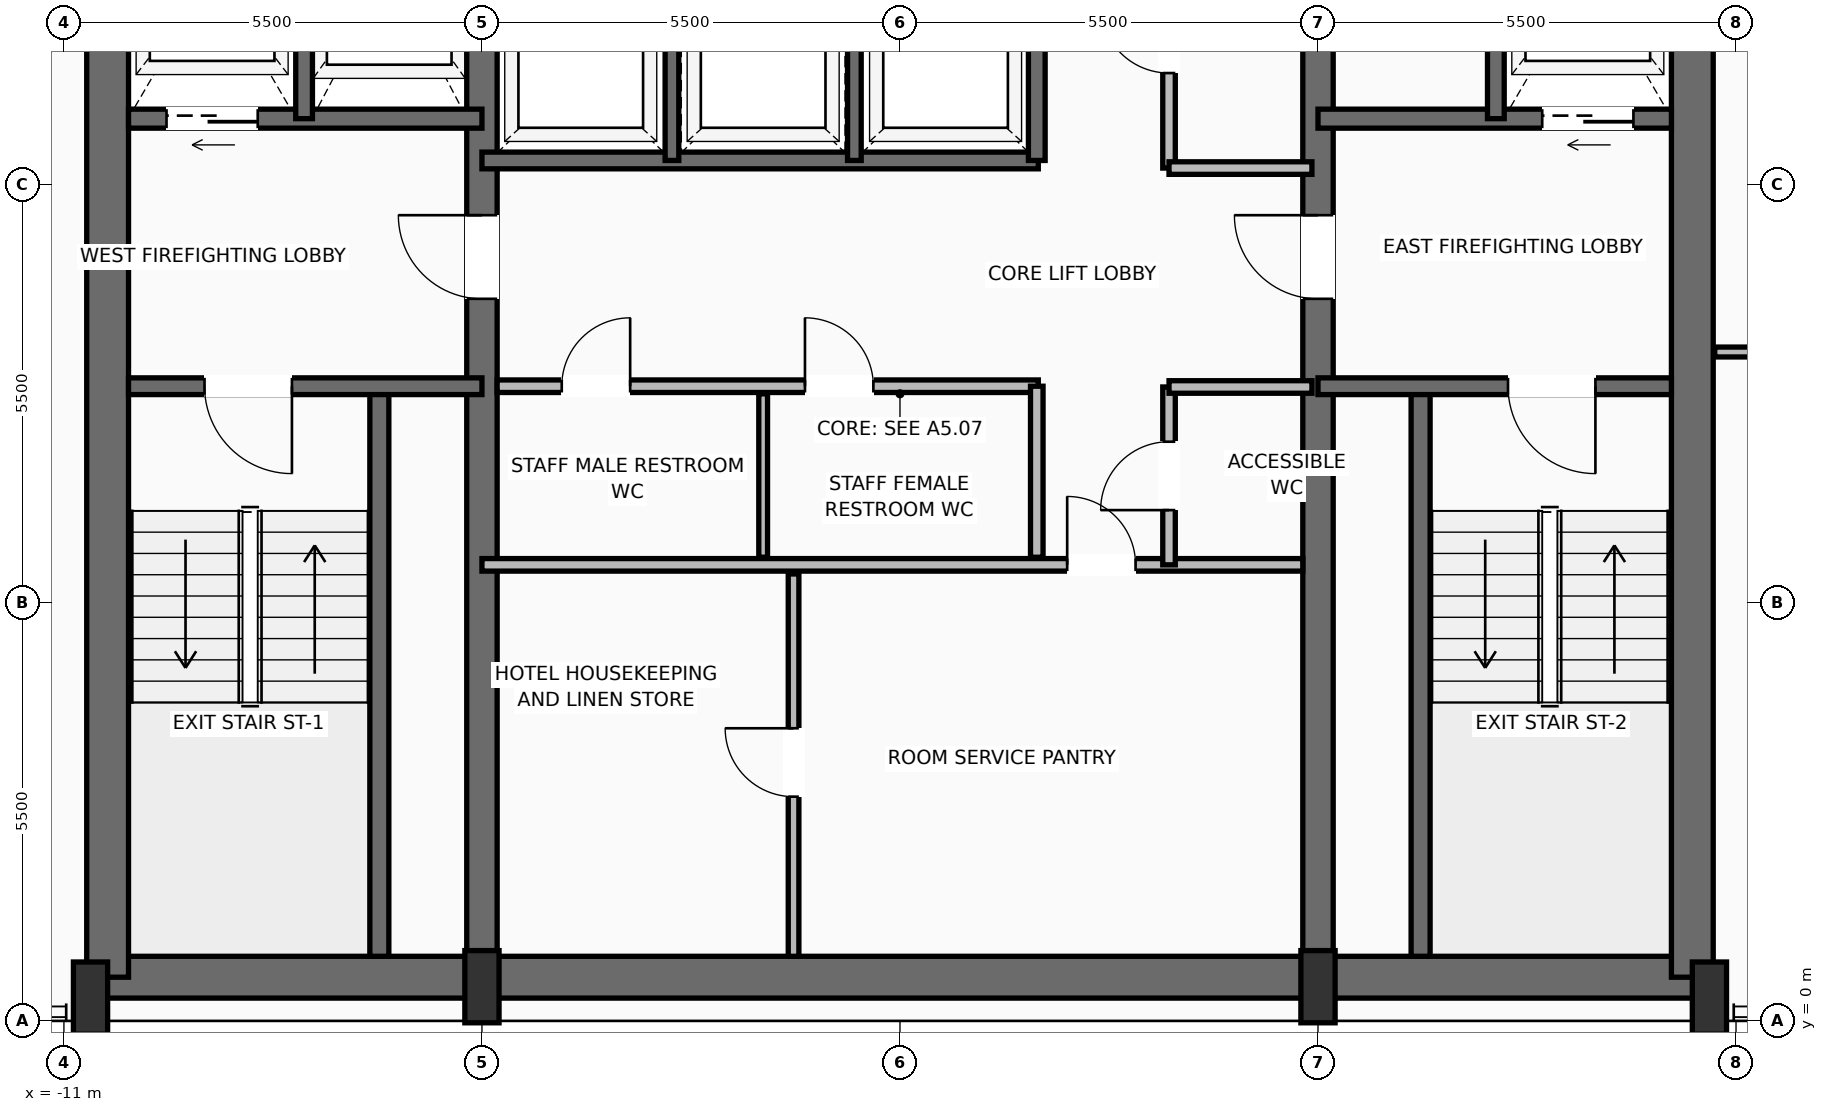
"""IFC4 building model, lengths in metres.
Left out: names, types, materials, properties, quantities, classifications, styles, units other than length and angle.
Written with IfcOpenShell. Run it as: python <this file> out.ifc"""

import sys

from ifc_helpers import new_model, si_unit, direction, frame, frame_2d, origin, origin_2d, place, context, subcontext, project, spatial, rectangle, extrude, source, transform, mapped, element, fill, save


model = new_model("IFC4")
c1 = context("Model", 3, precision=1e-05, world=origin(), true_north=direction((0.0, 1.0)))
c2 = subcontext(c1, "Body", "Model", "MODEL_VIEW")
j1 = project(units=[si_unit("LENGTHUNIT", "METRE"), si_unit("PLANEANGLEUNIT", "RADIAN")], contexts=[c1])
p1 = place(None, origin())
s1 = spatial("IfcSite", under=j1, at=p1, CompositionType="ELEMENT")
p2 = place(p1, origin())
s2 = spatial("IfcBuilding", under=s1, at=p2, CompositionType="ELEMENT")
p3 = place(p2, frame((0.0, 0.0, 240.7)))
s3 = spatial("IfcBuildingStorey", under=s2, at=p3, CompositionType="ELEMENT", Elevation=240.7)
p4 = place(p3, frame((-10.65, 0.575, 0.0), z_axis=(0.0, 0.0, 1.0), x_axis=(1.0, 0.0, 0.0)))
e1 = element("IfcWall", 1, at=p4, inside=s3, PredefinedType="SHEAR", context=c2, shape_type="SweptSolid", body=[
    extrude(rectangle(XDim=21.3, YDim=0.55, at=frame_2d((10.65, 0.0))), origin(), (0.0, 0.0, 1.0), 3.24),
])
for number, where, z_axis, x_axis in (
    (2, (-10.425, 0.575, 0.0), (0.0, 0.0, 1.0), (0.0, 1.0, 0.0)),
    (3, (10.425, 0.575, 0.0), (0.0, 0.0, 1.0), (0.0, 1.0, 0.0)),
):
    element("IfcWall", number, at=place(p3, frame(where, z_axis=z_axis, x_axis=x_axis)), inside=s3, PredefinedType="SHEAR", context=c2, shape_type="SweptSolid", body=[
        extrude(rectangle(XDim=15.45, YDim=0.55, at=frame_2d((7.725, 0.0))), origin(), (0.0, 0.0, 1.0), 3.24),
    ])
p5 = place(p3, frame((-5.5, 0.575, 0.0), z_axis=(0.0, 0.0, 1.0), x_axis=(0.0, 1.0, 0.0)))
e4 = element("IfcWall", 4, at=p5, inside=s3, PredefinedType="SHEAR", context=c2, shape_type="SweptSolid", body=[
    extrude(rectangle(XDim=15.45, YDim=0.4, at=frame_2d((7.725, 0.0))), origin(), (0.0, 0.0, 1.0), 3.24),
])
p6 = place(p5, frame((8.925, 0.0, 0.0)))
e5 = element("IfcOpeningElement", 5, at=p6, cuts=e4, PredefinedType="OPENING", context=c2, shape_type="SweptSolid", body=[
    extrude(rectangle(XDim=1.1, YDim=2.2, at=frame_2d((0.55, 1.1))), frame((0.0, 0.21, 0.0), z_axis=(0.0, -1.0, 0.0), x_axis=(1.0, 0.0, 0.0)), (0.0, 0.0, 1.0), 0.42),
])
p7 = place(p3, frame((5.5, 0.575, 0.0), z_axis=(0.0, 0.0, 1.0), x_axis=(0.0, 1.0, 0.0)))
e6 = element("IfcWall", 6, at=p7, inside=s3, PredefinedType="SHEAR", context=c2, shape_type="SweptSolid", body=[
    extrude(rectangle(XDim=15.45, YDim=0.4, at=frame_2d((7.725, 0.0))), origin(), (0.0, 0.0, 1.0), 3.24),
])
p8 = place(p7, frame((8.925, 0.0, 0.0)))
e7 = element("IfcOpeningElement", 7, at=p8, cuts=e6, PredefinedType="OPENING", context=c2, shape_type="SweptSolid", body=[
    extrude(rectangle(XDim=1.1, YDim=2.2, at=frame_2d((0.55, 1.1))), frame((0.0, 0.21, 0.0), z_axis=(0.0, -1.0, 0.0), x_axis=(1.0, 0.0, 0.0)), (0.0, 0.0, 1.0), 0.42),
])
m1 = source(origin(), c2, "Body", "SweptSolid", [
    extrude(rectangle(XDim=0.45, YDim=0.95, at=origin_2d()), origin(), (0.0, 0.0, 1.0), 3.45),
])
for number, where, z_axis, x_axis in (
    (8, (-10.65, 0.3, 0.0), (0.0, 0.0, 1.0), (1.0, 0.0, 0.0)),
    (9, (-5.5, 0.45, 0.0), (0.0, 0.0, 1.0), (1.0, 0.0, 0.0)),
    (10, (5.5, 0.45, 0.0), (0.0, 0.0, 1.0), (1.0, 0.0, 0.0)),
    (11, (10.65, 0.3, 0.0), (0.0, 0.0, 1.0), (1.0, 0.0, 0.0)),
):
    element("IfcColumn", number, at=place(p3, frame(where, z_axis=z_axis, x_axis=x_axis)), inside=s3, PredefinedType="PILASTER", context=c2, shape_type="MappedRepresentation", body=[
        mapped(m1, transform((0.0, 0.0, 0.0), scale=1.0)),
    ])
p9 = place(p3, frame((-6.85, 0.85, 0.0), z_axis=(0.0, 0.0, 1.0), x_axis=(0.0, 1.0, 0.0)))
e12 = element("IfcWall", 12, at=p9, inside=s3, PredefinedType="SOLIDWALL", context=c2, shape_type="SweptSolid", body=[
    extrude(rectangle(XDim=7.5, YDim=0.25, at=frame_2d((3.75, 0.0))), origin(), (0.0, 0.0, 1.0), 3.24),
])
p10 = place(p3, frame((-5.5, 8.35, 0.0), z_axis=(0.0, 0.0, 1.0), x_axis=(-1.0, 0.0, 0.0)))
e13 = element("IfcWall", 13, at=p10, inside=s3, PredefinedType="SOLIDWALL", context=c2, shape_type="SweptSolid", body=[
    extrude(rectangle(XDim=4.65, YDim=0.22, at=frame_2d((2.325, 0.0))), origin(), (0.0, 0.0, 1.0), 3.24),
])
p11 = place(p10, frame((2.5, 0.0, 0.0)))
e14 = element("IfcOpeningElement", 14, at=p11, cuts=e13, PredefinedType="OPENING", context=c2, shape_type="SweptSolid", body=[
    extrude(rectangle(XDim=1.15, YDim=2.2, at=frame_2d((0.575, 1.1))), frame((0.0, 0.12, 0.0), z_axis=(0.0, -1.0, 0.0), x_axis=(1.0, 0.0, 0.0)), (0.0, 0.0, 1.0), 0.24),
])
p12 = place(p3, frame((-5.5, 11.87, 0.0), z_axis=(0.0, 0.0, 1.0), x_axis=(-1.0, 0.0, 0.0)))
e15 = element("IfcWall", 15, at=p12, inside=s3, PredefinedType="SOLIDWALL", context=c2, shape_type="SweptSolid", body=[
    extrude(rectangle(XDim=4.65, YDim=0.25, at=frame_2d((2.325, 0.0))), origin(), (0.0, 0.0, 1.0), 3.24),
])
p13 = place(p12, frame((2.95, 0.0, 0.0)))
e16 = element("IfcOpeningElement", 16, at=p13, cuts=e15, PredefinedType="OPENING", context=c2, shape_type="SweptSolid", body=[
    extrude(rectangle(XDim=1.2, YDim=2.25, at=frame_2d((0.6, 1.125))), frame((0.0, 0.135, 0.0), z_axis=(0.0, -1.0, 0.0), x_axis=(1.0, 0.0, 0.0)), (0.0, 0.0, 1.0), 0.27),
])
p14 = place(p3, frame((-7.84, 11.87, 0.0), z_axis=(0.0, 0.0, 1.0), x_axis=(0.0, 1.0, 0.0)))
e17 = element("IfcWall", 17, at=p14, inside=s3, PredefinedType="SOLIDWALL", context=c2, shape_type="SweptSolid", body=[
    extrude(rectangle(XDim=3.88, YDim=0.22, at=frame_2d((1.94, 0.0))), origin(), (0.0, 0.0, 1.0), 3.24),
])
p15 = place(p3, frame((6.85, 0.85, 0.0), z_axis=(0.0, 0.0, 1.0), x_axis=(0.0, 1.0, 0.0)))
e18 = element("IfcWall", 18, at=p15, inside=s3, PredefinedType="SOLIDWALL", context=c2, shape_type="SweptSolid", body=[
    extrude(rectangle(XDim=7.5, YDim=0.25, at=frame_2d((3.75, 0.0))), origin(), (0.0, 0.0, 1.0), 3.24),
])
p16 = place(p3, frame((10.15, 8.35, 0.0), z_axis=(0.0, 0.0, 1.0), x_axis=(-1.0, 0.0, 0.0)))
e19 = element("IfcWall", 19, at=p16, inside=s3, PredefinedType="SOLIDWALL", context=c2, shape_type="SweptSolid", body=[
    extrude(rectangle(XDim=4.65, YDim=0.22, at=frame_2d((2.325, 0.0))), origin(), (0.0, 0.0, 1.0), 3.24),
])
p17 = place(p16, frame((1.0, 0.0, 0.0)))
e20 = element("IfcOpeningElement", 20, at=p17, cuts=e19, PredefinedType="OPENING", context=c2, shape_type="SweptSolid", body=[
    extrude(rectangle(XDim=1.15, YDim=2.2, at=frame_2d((0.575, 1.1))), frame((0.0, 0.12, 0.0), z_axis=(0.0, -1.0, 0.0), x_axis=(1.0, 0.0, 0.0)), (0.0, 0.0, 1.0), 0.24),
])
p18 = place(p3, frame((10.15, 11.87, 0.0), z_axis=(0.0, 0.0, 1.0), x_axis=(-1.0, 0.0, 0.0)))
e21 = element("IfcWall", 21, at=p18, inside=s3, PredefinedType="SOLIDWALL", context=c2, shape_type="SweptSolid", body=[
    extrude(rectangle(XDim=4.65, YDim=0.25, at=frame_2d((2.325, 0.0))), origin(), (0.0, 0.0, 1.0), 3.24),
])
p19 = place(p18, frame((0.5, 0.0, 0.0)))
e22 = element("IfcOpeningElement", 22, at=p19, cuts=e21, PredefinedType="OPENING", context=c2, shape_type="SweptSolid", body=[
    extrude(rectangle(XDim=1.2, YDim=2.25, at=frame_2d((0.6, 1.125))), frame((0.0, 0.135, 0.0), z_axis=(0.0, -1.0, 0.0), x_axis=(1.0, 0.0, 0.0)), (0.0, 0.0, 1.0), 0.27),
])
p20 = place(p3, frame((7.84, 11.87, 0.0), z_axis=(0.0, 0.0, 1.0), x_axis=(0.0, 1.0, 0.0)))
e23 = element("IfcWall", 23, at=p20, inside=s3, PredefinedType="SOLIDWALL", context=c2, shape_type="SweptSolid", body=[
    extrude(rectangle(XDim=3.88, YDim=0.22, at=frame_2d((1.94, 0.0))), origin(), (0.0, 0.0, 1.0), 3.24),
])
p21 = place(p3, frame((-5.5, 6.0, 0.0), z_axis=(0.0, 0.0, 1.0), x_axis=(1.0, 0.0, 0.0)))
e24 = element("IfcWall", 24, at=p21, inside=s3, PredefinedType="PARTITIONING", context=c2, shape_type="SweptSolid", body=[
    extrude(rectangle(XDim=10.8, YDim=0.165, at=frame_2d((5.4, 0.0))), origin(), (0.0, 0.0, 1.0), 3.232),
])
p22 = place(p21, frame((7.7, 0.0, 0.0)))
e25 = element("IfcOpeningElement", 25, at=p22, cuts=e24, PredefinedType="OPENING", context=c2, shape_type="SweptSolid", body=[
    extrude(rectangle(XDim=0.9, YDim=2.1, at=frame_2d((0.45, 1.05))), frame((0.0, 0.093, 0.0), z_axis=(0.0, -1.0, 0.0), x_axis=(1.0, 0.0, 0.0)), (0.0, 0.0, 1.0), 0.185),
])
p23 = place(p3, frame((-1.4, 0.85, 0.0), z_axis=(0.0, 0.0, 1.0), x_axis=(0.0, 1.0, 0.0)))
e26 = element("IfcWall", 26, at=p23, inside=s3, PredefinedType="PARTITIONING", context=c2, shape_type="SweptSolid", body=[
    extrude(rectangle(XDim=5.03, YDim=0.14, at=frame_2d((2.515, 0.0))), origin(), (0.0, 0.0, 1.0), 3.232),
])
p24 = place(p23, frame((2.1, 0.0, 0.0)))
e27 = element("IfcOpeningElement", 27, at=p24, cuts=e26, PredefinedType="OPENING", context=c2, shape_type="SweptSolid", body=[
    extrude(rectangle(XDim=0.9, YDim=2.1, at=frame_2d((0.45, 1.05))), frame((0.0, 0.08, 0.0), z_axis=(0.0, -1.0, 0.0), x_axis=(1.0, 0.0, 0.0)), (0.0, 0.0, 1.0), 0.16),
])
p25 = place(p3, frame((3.54, 6.0, 0.0), z_axis=(0.0, 0.0, 1.0), x_axis=(0.0, 1.0, 0.0)))
e28 = element("IfcWall", 28, at=p25, inside=s3, PredefinedType="PARTITIONING", context=c2, shape_type="SweptSolid", body=[
    extrude(rectangle(XDim=2.34, YDim=0.165, at=frame_2d((1.17, 0.0))), origin(), (0.0, 0.0, 1.0), 3.232),
])
p26 = place(p25, frame((0.72, 0.0, 0.0)))
e29 = element("IfcOpeningElement", 29, at=p26, cuts=e28, PredefinedType="OPENING", context=c2, shape_type="SweptSolid", body=[
    extrude(rectangle(XDim=0.9, YDim=2.1, at=frame_2d((0.45, 1.05))), frame((0.0, 0.093, 0.0), z_axis=(0.0, -1.0, 0.0), x_axis=(1.0, 0.0, 0.0)), (0.0, 0.0, 1.0), 0.185),
])
p27 = place(p3, frame((3.54, 8.34, 0.0), z_axis=(0.0, 0.0, 1.0), x_axis=(1.0, 0.0, 0.0)))
e30 = element("IfcWall", 30, at=p27, inside=s3, PredefinedType="PARTITIONING", context=c2, shape_type="SweptSolid", body=[
    extrude(rectangle(XDim=1.88, YDim=0.165, at=frame_2d((0.94, 0.0))), origin(), (0.0, 0.0, 1.0), 3.232),
])
p28 = place(p3, frame((-5.3, 8.35, 0.0), z_axis=(0.0, 0.0, 1.0), x_axis=(1.0, 0.0, 0.0)))
e31 = element("IfcWall", 31, at=p28, inside=s3, PredefinedType="PARTITIONING", context=c2, shape_type="SweptSolid", body=[
    extrude(rectangle(XDim=7.12, YDim=0.165, at=frame_2d((3.56, 0.0))), origin(), (0.0, 0.0, 1.0), 3.232),
])
p29 = place(p28, frame((0.85, 0.0, 0.0)))
e32 = element("IfcOpeningElement", 32, at=p29, cuts=e31, PredefinedType="OPENING", context=c2, shape_type="SweptSolid", body=[
    extrude(rectangle(XDim=0.9, YDim=2.1, at=frame_2d((0.45, 1.05))), frame((0.0, 0.093, 0.0), z_axis=(0.0, -1.0, 0.0), x_axis=(1.0, 0.0, 0.0)), (0.0, 0.0, 1.0), 0.185),
])
p30 = place(p28, frame((4.05, 0.0, 0.0)))
e33 = element("IfcOpeningElement", 33, at=p30, cuts=e31, PredefinedType="OPENING", context=c2, shape_type="SweptSolid", body=[
    extrude(rectangle(XDim=0.9, YDim=2.1, at=frame_2d((0.45, 1.05))), frame((0.0, 0.093, 0.0), z_axis=(0.0, -1.0, 0.0), x_axis=(1.0, 0.0, 0.0)), (0.0, 0.0, 1.0), 0.185),
])
p31 = place(p3, frame((1.8, 6.1, 0.0), z_axis=(0.0, 0.0, 1.0), x_axis=(0.0, 1.0, 0.0)))
e34 = element("IfcWall", 34, at=p31, inside=s3, PredefinedType="PARTITIONING", context=c2, shape_type="SweptSolid", body=[
    extrude(rectangle(XDim=2.25, YDim=0.165, at=frame_2d((1.125, 0.0))), origin(), (0.0, 0.0, 1.0), 3.232),
])
p32 = place(p3, frame((-1.8, 6.1, 0.0), z_axis=(0.0, 0.0, 1.0), x_axis=(0.0, 1.0, 0.0)))
e35 = element("IfcWall", 35, at=p32, inside=s3, PredefinedType="PARTITIONING", context=c2, shape_type="SweptSolid", body=[
    extrude(rectangle(XDim=2.15, YDim=0.115, at=frame_2d((1.075, 0.0))), origin(), (0.0, 0.0, 1.0), 3.232),
])
p33 = place(p3, frame((-5.5, 11.32, 0.0), z_axis=(0.0, 0.0, 1.0), x_axis=(1.0, 0.0, 0.0)))
e36 = element("IfcWall", 36, at=p33, inside=s3, PredefinedType="SOLIDWALL", context=c2, shape_type="SweptSolid", body=[
    extrude(rectangle(XDim=7.32, YDim=0.22, at=frame_2d((3.66, 0.0))), origin(), (0.0, 0.0, 1.0), 3.24),
])
p34 = place(p3, frame((1.8, 11.32, 0.0), z_axis=(0.0, 0.0, 1.0), x_axis=(0.0, 1.0, 0.0)))
e37 = element("IfcWall", 37, at=p34, inside=s3, PredefinedType="SOLIDWALL", context=c2, shape_type="SweptSolid", body=[
    extrude(rectangle(XDim=2.3, YDim=0.22, at=frame_2d((1.15, 0.0))), origin(), (0.0, 0.0, 1.0), 3.24),
])
for number, where, z_axis, x_axis in (
    (38, (-3.0, 11.32, 0.0), (0.0, 0.0, 1.0), (0.0, 1.0, 0.0)),
    (39, (-0.6, 11.32, 0.0), (0.0, 0.0, 1.0), (0.0, 1.0, 0.0)),
):
    element("IfcWall", number, at=place(p3, frame(where, z_axis=z_axis, x_axis=x_axis)), inside=s3, PredefinedType="SOLIDWALL", context=c2, shape_type="SweptSolid", body=[
        extrude(rectangle(XDim=2.3, YDim=0.18, at=frame_2d((1.15, 0.0))), origin(), (0.0, 0.0, 1.0), 3.24),
    ])
p35 = place(p3, frame((3.54, 11.22, 0.0), z_axis=(0.0, 0.0, 1.0), x_axis=(0.0, 1.0, 0.0)))
e40 = element("IfcWall", 40, at=p35, inside=s3, PredefinedType="PARTITIONING", context=c2, shape_type="SweptSolid", body=[
    extrude(rectangle(XDim=4.53, YDim=0.165, at=frame_2d((2.265, 0.0))), origin(), (0.0, 0.0, 1.0), 3.232),
])
p36 = place(p35, frame((1.25, 0.0, 0.0)))
e41 = element("IfcOpeningElement", 41, at=p36, cuts=e40, PredefinedType="OPENING", context=c2, shape_type="SweptSolid", body=[
    extrude(rectangle(XDim=0.9, YDim=2.1, at=frame_2d((0.45, 1.05))), frame((0.0, 0.093, 0.0), z_axis=(0.0, -1.0, 0.0), x_axis=(1.0, 0.0, 0.0)), (0.0, 0.0, 1.0), 0.185),
])
p37 = place(p3, frame((3.54, 11.22, 0.0), z_axis=(0.0, 0.0, 1.0), x_axis=(1.0, 0.0, 0.0)))
e42 = element("IfcWall", 42, at=p37, inside=s3, PredefinedType="PARTITIONING", context=c2, shape_type="SweptSolid", body=[
    extrude(rectangle(XDim=1.88, YDim=0.165, at=frame_2d((0.94, 0.0))), origin(), (0.0, 0.0, 1.0), 3.232),
])
p38 = place(p3, frame((10.72, 8.8, 0.0), z_axis=(0.0, 0.0, 1.0), x_axis=(1.0, 0.0, 0.0)))
e43 = element("IfcWall", 43, at=p38, inside=s3, PredefinedType="PARTITIONING", context=c2, shape_type="SweptSolid", body=[
    extrude(rectangle(XDim=12.229, YDim=0.13, at=frame_2d((6.115, 0.0))), origin(), (0.0, 0.0, 1.0), 3.232),
])
p39 = place(p38, frame((5.062, 0.0, 0.0)))
e44 = element("IfcOpeningElement", 44, at=p39, cuts=e43, PredefinedType="OPENING", context=c2, shape_type="SweptSolid", body=[
    extrude(rectangle(XDim=0.95, YDim=2.2, at=frame_2d((0.475, 1.1))), frame((0.0, 0.075, 0.0), z_axis=(0.0, -1.0, 0.0), x_axis=(1.0, 0.0, 0.0)), (0.0, 0.0, 1.0), 0.15),
])
m2 = source(origin(), c2, "Body", "SweptSolid", [
    extrude(rectangle(XDim=1.15, YDim=2.2, at=frame_2d((0.575, 1.1))), frame((0.0, 0.025, 0.0), z_axis=(0.0, -1.0, 0.0), x_axis=(1.0, 0.0, 0.0)), (0.0, 0.0, 1.0), 0.05),
])
p40 = place(p11, origin())
e45 = element("IfcDoor", 45, at=p40, inside=s3, OperationType="SINGLE_SWING_LEFT", PredefinedType="DOOR", context=c2, shape_type="MappedRepresentation", body=[
    mapped(m2, transform((0.0, 0.0, 0.0), scale=1.0)),
])
fill(e14, e45)
m3 = source(origin(), c2, "Body", "SweptSolid", [
    extrude(rectangle(XDim=1.1, YDim=2.2, at=frame_2d((0.55, 1.1))), frame((0.0, 0.025, 0.0), z_axis=(0.0, -1.0, 0.0), x_axis=(1.0, 0.0, 0.0)), (0.0, 0.0, 1.0), 0.05),
])
p41 = place(p6, origin())
e46 = element("IfcDoor", 46, at=p41, inside=s3, OperationType="SINGLE_SWING_RIGHT", PredefinedType="DOOR", context=c2, shape_type="MappedRepresentation", body=[
    mapped(m3, transform((0.0, 0.0, 0.0), scale=1.0)),
])
fill(e5, e46)
m4 = source(origin(), c2, "Body", "SweptSolid", [
    extrude(rectangle(XDim=1.2, YDim=2.25, at=frame_2d((0.6, 1.125))), frame((0.0, 0.025, 0.0), z_axis=(0.0, -1.0, 0.0), x_axis=(1.0, 0.0, 0.0)), (0.0, 0.0, 1.0), 0.05),
])
p42 = place(p13, origin())
e47 = element("IfcDoor", 47, at=p42, inside=s3, OperationType="SLIDING_TO_LEFT", PredefinedType="DOOR", context=c2, shape_type="MappedRepresentation", body=[
    mapped(m4, transform((0.0, 0.0, 0.0), scale=1.0)),
])
fill(e16, e47)
p43 = place(p17, origin())
e48 = element("IfcDoor", 48, at=p43, inside=s3, OperationType="SINGLE_SWING_LEFT", PredefinedType="DOOR", context=c2, shape_type="MappedRepresentation", body=[
    mapped(m2, transform((0.0, 0.0, 0.0), scale=1.0)),
])
fill(e20, e48)
p44 = place(p8, origin())
e49 = element("IfcDoor", 49, at=p44, inside=s3, OperationType="SINGLE_SWING_RIGHT", PredefinedType="DOOR", context=c2, shape_type="MappedRepresentation", body=[
    mapped(m3, transform((0.0, 0.0, 0.0), scale=1.0)),
])
fill(e7, e49)
p45 = place(p19, origin())
e50 = element("IfcDoor", 50, at=p45, inside=s3, OperationType="SLIDING_TO_RIGHT", PredefinedType="DOOR", context=c2, shape_type="MappedRepresentation", body=[
    mapped(m4, transform((0.0, 0.0, 0.0), scale=1.0)),
])
fill(e22, e50)
m5 = source(origin(), c2, "Body", "SweptSolid", [
    extrude(rectangle(XDim=0.9, YDim=2.1, at=frame_2d((0.45, 1.05))), frame((0.0, 0.025, 0.0), z_axis=(0.0, -1.0, 0.0), x_axis=(1.0, 0.0, 0.0)), (0.0, 0.0, 1.0), 0.05),
])
p46 = place(p22, origin())
e51 = element("IfcDoor", 51, at=p46, inside=s3, OperationType="SINGLE_SWING_LEFT", PredefinedType="DOOR", context=c2, shape_type="MappedRepresentation", body=[
    mapped(m5, transform((0.0, 0.0, 0.0), scale=1.0)),
])
fill(e25, e51)
p47 = place(p24, origin())
e52 = element("IfcDoor", 52, at=p47, inside=s3, OperationType="SINGLE_SWING_RIGHT", PredefinedType="DOOR", context=c2, shape_type="MappedRepresentation", body=[
    mapped(m5, transform((0.0, 0.0, 0.0), scale=1.0)),
])
fill(e27, e52)
p48 = place(p26, origin())
e53 = element("IfcDoor", 53, at=p48, inside=s3, OperationType="SINGLE_SWING_LEFT", PredefinedType="DOOR", context=c2, shape_type="MappedRepresentation", body=[
    mapped(m5, transform((0.0, 0.0, 0.0), scale=1.0)),
])
fill(e29, e53)
p49 = place(p29, origin())
e54 = element("IfcDoor", 54, at=p49, inside=s3, OperationType="SINGLE_SWING_RIGHT", PredefinedType="DOOR", context=c2, shape_type="MappedRepresentation", body=[
    mapped(m5, transform((0.0, 0.0, 0.0), scale=1.0)),
])
fill(e32, e54)
p50 = place(p30, origin())
e55 = element("IfcDoor", 55, at=p50, inside=s3, OperationType="SINGLE_SWING_LEFT", PredefinedType="DOOR", context=c2, shape_type="MappedRepresentation", body=[
    mapped(m5, transform((0.0, 0.0, 0.0), scale=1.0)),
])
fill(e33, e55)
p51 = place(p36, origin())
e56 = element("IfcDoor", 56, at=p51, inside=s3, OperationType="SINGLE_SWING_RIGHT", PredefinedType="DOOR", context=c2, shape_type="MappedRepresentation", body=[
    mapped(m5, transform((0.0, 0.0, 0.0), scale=1.0)),
])
fill(e41, e56)
save(model, sys.argv[1])
